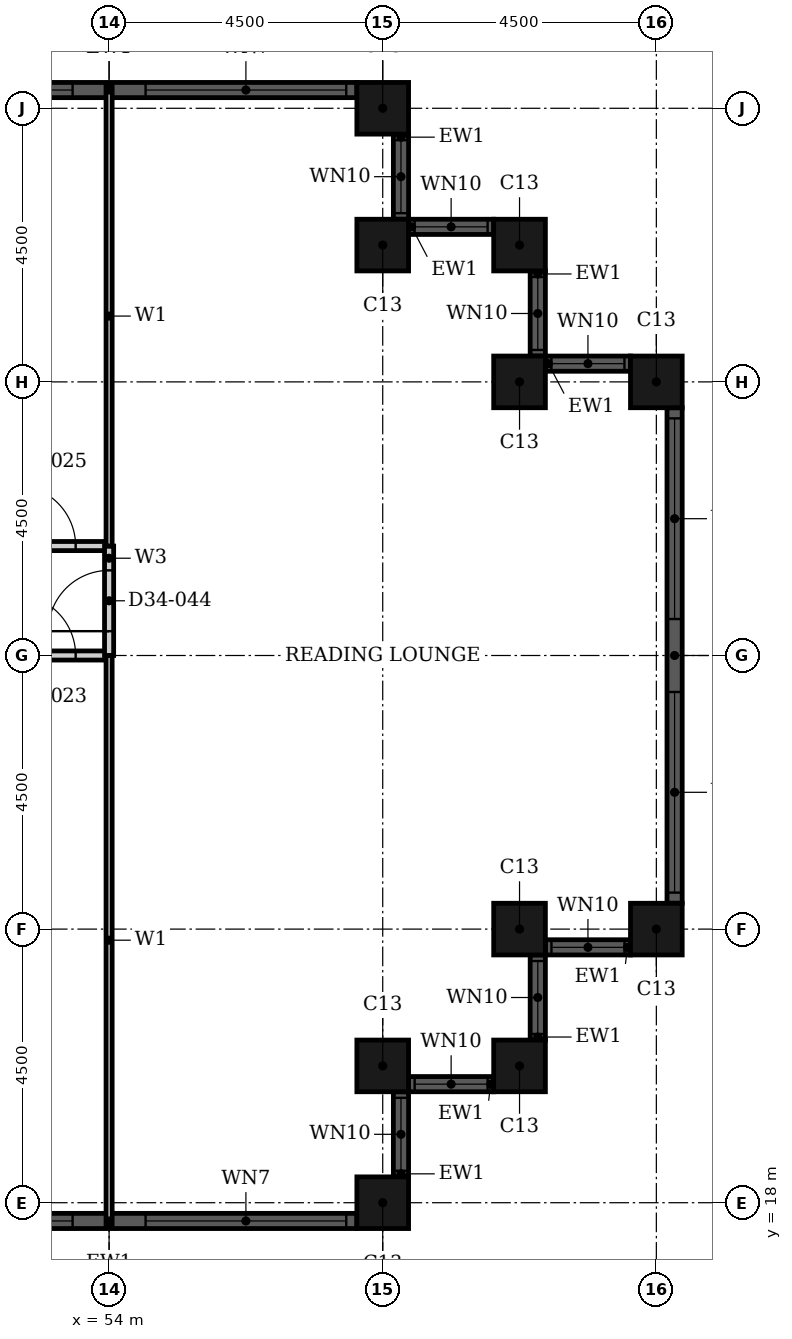
"""IFC4 building model, lengths in metres.
Left out: names, types, materials, properties, quantities, classifications, styles, units other than length and angle.
Written with IfcOpenShell. Run it as: python <this file> out.ifc"""

import sys

from ifc_helpers import new_model, si_unit, direction, frame, frame_2d, origin, origin_2d, place, context, subcontext, project, spatial, rectangle, hollow_rectangle, extrude, element, fill, save


model = new_model("IFC4")
c1 = context("Model", 3, precision=1e-05, world=origin(), true_north=direction((0.0, 1.0)))
c2 = subcontext(c1, "Body", "Model", "MODEL_VIEW")
j1 = project(units=[si_unit("LENGTHUNIT", "METRE"), si_unit("PLANEANGLEUNIT", "RADIAN")], contexts=[c1])
p1 = place(None, origin())
s1 = spatial("IfcSite", under=j1, at=p1, CompositionType="ELEMENT")
p2 = place(p1, origin())
s2 = spatial("IfcBuilding", under=s1, at=p2, CompositionType="ELEMENT")
p3 = place(p2, frame((0.0, 0.0, 136.8)))
s3 = spatial("IfcBuildingStorey", under=s2, at=p3, CompositionType="ELEMENT", Elevation=136.8)
for number, where, z_axis, x_axis in (
    (1, (58.5, 18.0, 0.0), (0.0, 0.0, 1.0), (1.0, 0.0, 0.0)),
    (2, (58.5, 20.25, 0.0), (0.0, 0.0, 1.0), (1.0, 0.0, 0.0)),
    (3, (60.75, 20.25, 0.0), (0.0, 0.0, 1.0), (1.0, 0.0, 0.0)),
    (4, (60.75, 22.5, 0.0), (0.0, 0.0, 1.0), (1.0, 0.0, 0.0)),
    (5, (63.0, 22.5, 0.0), (0.0, 0.0, 1.0), (1.0, 0.0, 0.0)),
    (6, (63.0, 31.5, 0.0), (0.0, 0.0, 1.0), (1.0, 0.0, 0.0)),
    (7, (60.75, 31.5, 0.0), (0.0, 0.0, 1.0), (1.0, 0.0, 0.0)),
    (8, (60.75, 33.75, 0.0), (0.0, 0.0, 1.0), (1.0, 0.0, 0.0)),
    (9, (58.5, 33.75, 0.0), (0.0, 0.0, 1.0), (1.0, 0.0, 0.0)),
    (10, (58.5, 36.0, 0.0), (0.0, 0.0, 1.0), (1.0, 0.0, 0.0)),
):
    element("IfcColumn", number, at=place(p3, frame(where, z_axis=z_axis, x_axis=x_axis)), inside=s3, PredefinedType="COLUMN", context=c2, shape_type="SweptSolid", body=[
        extrude(hollow_rectangle(XDim=0.85, YDim=0.85, WallThickness=0.026, at=origin_2d()), origin(), (0.0, 0.0, 1.0), 3.6),
    ])
p4 = place(p3, frame((49.925, 17.7, 0.0), z_axis=(0.0, 0.0, 1.0), x_axis=(1.0, 0.0, 0.0)))
e11 = element("IfcWall", 11, at=p4, inside=s3, PredefinedType="SOLIDWALL", context=c2, shape_type="SweptSolid", body=[
    extrude(rectangle(XDim=8.15, YDim=0.25, at=frame_2d((4.075, 0.0))), origin(), (0.0, 0.0, 1.0), 3.6),
])
p5 = place(p4, frame((0.175, 0.0, 0.9)))
e12 = element("IfcOpeningElement", 12, at=p5, cuts=e11, PredefinedType="OPENING", context=c2, shape_type="SweptSolid", body=[
    extrude(rectangle(XDim=3.3, YDim=1.85, at=frame_2d((1.65, 0.925))), frame((0.0, 0.135, 0.0), z_axis=(0.0, -1.0, 0.0), x_axis=(1.0, 0.0, 0.0)), (0.0, 0.0, 1.0), 0.27),
])
p6 = place(p4, frame((4.675, 0.0, 0.9)))
e13 = element("IfcOpeningElement", 13, at=p6, cuts=e11, PredefinedType="OPENING", context=c2, shape_type="SweptSolid", body=[
    extrude(rectangle(XDim=3.3, YDim=1.85, at=frame_2d((1.65, 0.925))), frame((0.0, 0.135, 0.0), z_axis=(0.0, -1.0, 0.0), x_axis=(1.0, 0.0, 0.0)), (0.0, 0.0, 1.0), 0.27),
])
p7 = place(p3, frame((58.8, 18.425, 0.0), z_axis=(0.0, 0.0, 1.0), x_axis=(0.0, 1.0, 0.0)))
e14 = element("IfcWall", 14, at=p7, inside=s3, PredefinedType="SOLIDWALL", context=c2, shape_type="SweptSolid", body=[
    extrude(rectangle(XDim=1.4, YDim=0.25, at=frame_2d((0.7, 0.0))), origin(), (0.0, 0.0, 1.0), 3.6),
])
p8 = place(p7, frame((0.1, 0.0, 0.9)))
e15 = element("IfcOpeningElement", 15, at=p8, cuts=e14, PredefinedType="OPENING", context=c2, shape_type="SweptSolid", body=[
    extrude(rectangle(XDim=1.2, YDim=1.85, at=frame_2d((0.6, 0.925))), frame((0.0, 0.135, 0.0), z_axis=(0.0, -1.0, 0.0), x_axis=(1.0, 0.0, 0.0)), (0.0, 0.0, 1.0), 0.27),
])
p9 = place(p3, frame((58.925, 19.95, 0.0), z_axis=(0.0, 0.0, 1.0), x_axis=(1.0, 0.0, 0.0)))
e16 = element("IfcWall", 16, at=p9, inside=s3, PredefinedType="SOLIDWALL", context=c2, shape_type="SweptSolid", body=[
    extrude(rectangle(XDim=1.4, YDim=0.25, at=frame_2d((0.7, 0.0))), origin(), (0.0, 0.0, 1.0), 3.6),
])
p10 = place(p9, frame((0.1, 0.0, 0.9)))
e17 = element("IfcOpeningElement", 17, at=p10, cuts=e16, PredefinedType="OPENING", context=c2, shape_type="SweptSolid", body=[
    extrude(rectangle(XDim=1.2, YDim=1.85, at=frame_2d((0.6, 0.925))), frame((0.0, 0.135, 0.0), z_axis=(0.0, -1.0, 0.0), x_axis=(1.0, 0.0, 0.0)), (0.0, 0.0, 1.0), 0.27),
])
p11 = place(p3, frame((61.05, 20.675, 0.0), z_axis=(0.0, 0.0, 1.0), x_axis=(0.0, 1.0, 0.0)))
e18 = element("IfcWall", 18, at=p11, inside=s3, PredefinedType="SOLIDWALL", context=c2, shape_type="SweptSolid", body=[
    extrude(rectangle(XDim=1.4, YDim=0.25, at=frame_2d((0.7, 0.0))), origin(), (0.0, 0.0, 1.0), 3.6),
])
p12 = place(p11, frame((0.1, 0.0, 0.9)))
e19 = element("IfcOpeningElement", 19, at=p12, cuts=e18, PredefinedType="OPENING", context=c2, shape_type="SweptSolid", body=[
    extrude(rectangle(XDim=1.2, YDim=1.85, at=frame_2d((0.6, 0.925))), frame((0.0, 0.135, 0.0), z_axis=(0.0, -1.0, 0.0), x_axis=(1.0, 0.0, 0.0)), (0.0, 0.0, 1.0), 0.27),
])
p13 = place(p3, frame((61.175, 22.2, 0.0), z_axis=(0.0, 0.0, 1.0), x_axis=(1.0, 0.0, 0.0)))
e20 = element("IfcWall", 20, at=p13, inside=s3, PredefinedType="SOLIDWALL", context=c2, shape_type="SweptSolid", body=[
    extrude(rectangle(XDim=1.4, YDim=0.25, at=frame_2d((0.7, 0.0))), origin(), (0.0, 0.0, 1.0), 3.6),
])
p14 = place(p13, frame((0.1, 0.0, 0.9)))
e21 = element("IfcOpeningElement", 21, at=p14, cuts=e20, PredefinedType="OPENING", context=c2, shape_type="SweptSolid", body=[
    extrude(rectangle(XDim=1.2, YDim=1.85, at=frame_2d((0.6, 0.925))), frame((0.0, 0.135, 0.0), z_axis=(0.0, -1.0, 0.0), x_axis=(1.0, 0.0, 0.0)), (0.0, 0.0, 1.0), 0.27),
])
p15 = place(p3, frame((63.3, 22.925, 0.0), z_axis=(0.0, 0.0, 1.0), x_axis=(0.0, 1.0, 0.0)))
e22 = element("IfcWall", 22, at=p15, inside=s3, PredefinedType="SOLIDWALL", context=c2, shape_type="SweptSolid", body=[
    extrude(rectangle(XDim=8.15, YDim=0.25, at=frame_2d((4.075, 0.0))), origin(), (0.0, 0.0, 1.0), 3.6),
])
p16 = place(p15, frame((0.175, 0.0, 0.9)))
e23 = element("IfcOpeningElement", 23, at=p16, cuts=e22, PredefinedType="OPENING", context=c2, shape_type="SweptSolid", body=[
    extrude(rectangle(XDim=3.3, YDim=1.85, at=frame_2d((1.65, 0.925))), frame((0.0, 0.135, 0.0), z_axis=(0.0, -1.0, 0.0), x_axis=(1.0, 0.0, 0.0)), (0.0, 0.0, 1.0), 0.27),
])
p17 = place(p15, frame((4.675, 0.0, 0.9)))
e24 = element("IfcOpeningElement", 24, at=p17, cuts=e22, PredefinedType="OPENING", context=c2, shape_type="SweptSolid", body=[
    extrude(rectangle(XDim=3.3, YDim=1.85, at=frame_2d((1.65, 0.925))), frame((0.0, 0.135, 0.0), z_axis=(0.0, -1.0, 0.0), x_axis=(1.0, 0.0, 0.0)), (0.0, 0.0, 1.0), 0.27),
])
p18 = place(p3, frame((62.575, 31.8, 0.0), z_axis=(0.0, 0.0, 1.0), x_axis=(-1.0, 0.0, 0.0)))
e25 = element("IfcWall", 25, at=p18, inside=s3, PredefinedType="SOLIDWALL", context=c2, shape_type="SweptSolid", body=[
    extrude(rectangle(XDim=1.4, YDim=0.25, at=frame_2d((0.7, 0.0))), origin(), (0.0, 0.0, 1.0), 3.6),
])
p19 = place(p18, frame((0.1, 0.0, 0.9)))
e26 = element("IfcOpeningElement", 26, at=p19, cuts=e25, PredefinedType="OPENING", context=c2, shape_type="SweptSolid", body=[
    extrude(rectangle(XDim=1.2, YDim=1.85, at=frame_2d((0.6, 0.925))), frame((0.0, 0.135, 0.0), z_axis=(0.0, -1.0, 0.0), x_axis=(1.0, 0.0, 0.0)), (0.0, 0.0, 1.0), 0.27),
])
p20 = place(p3, frame((61.05, 31.925, 0.0), z_axis=(0.0, 0.0, 1.0), x_axis=(0.0, 1.0, 0.0)))
e27 = element("IfcWall", 27, at=p20, inside=s3, PredefinedType="SOLIDWALL", context=c2, shape_type="SweptSolid", body=[
    extrude(rectangle(XDim=1.4, YDim=0.25, at=frame_2d((0.7, 0.0))), origin(), (0.0, 0.0, 1.0), 3.6),
])
p21 = place(p20, frame((0.1, 0.0, 0.9)))
e28 = element("IfcOpeningElement", 28, at=p21, cuts=e27, PredefinedType="OPENING", context=c2, shape_type="SweptSolid", body=[
    extrude(rectangle(XDim=1.2, YDim=1.85, at=frame_2d((0.6, 0.925))), frame((0.0, 0.135, 0.0), z_axis=(0.0, -1.0, 0.0), x_axis=(1.0, 0.0, 0.0)), (0.0, 0.0, 1.0), 0.27),
])
p22 = place(p3, frame((60.325, 34.05, 0.0), z_axis=(0.0, 0.0, 1.0), x_axis=(-1.0, 0.0, 0.0)))
e29 = element("IfcWall", 29, at=p22, inside=s3, PredefinedType="SOLIDWALL", context=c2, shape_type="SweptSolid", body=[
    extrude(rectangle(XDim=1.4, YDim=0.25, at=frame_2d((0.7, 0.0))), origin(), (0.0, 0.0, 1.0), 3.6),
])
p23 = place(p22, frame((0.1, 0.0, 0.9)))
e30 = element("IfcOpeningElement", 30, at=p23, cuts=e29, PredefinedType="OPENING", context=c2, shape_type="SweptSolid", body=[
    extrude(rectangle(XDim=1.2, YDim=1.85, at=frame_2d((0.6, 0.925))), frame((0.0, 0.135, 0.0), z_axis=(0.0, -1.0, 0.0), x_axis=(1.0, 0.0, 0.0)), (0.0, 0.0, 1.0), 0.27),
])
p24 = place(p3, frame((58.8, 34.175, 0.0), z_axis=(0.0, 0.0, 1.0), x_axis=(0.0, 1.0, 0.0)))
e31 = element("IfcWall", 31, at=p24, inside=s3, PredefinedType="SOLIDWALL", context=c2, shape_type="SweptSolid", body=[
    extrude(rectangle(XDim=1.4, YDim=0.25, at=frame_2d((0.7, 0.0))), origin(), (0.0, 0.0, 1.0), 3.6),
])
p25 = place(p24, frame((0.1, 0.0, 0.9)))
e32 = element("IfcOpeningElement", 32, at=p25, cuts=e31, PredefinedType="OPENING", context=c2, shape_type="SweptSolid", body=[
    extrude(rectangle(XDim=1.2, YDim=1.85, at=frame_2d((0.6, 0.925))), frame((0.0, 0.135, 0.0), z_axis=(0.0, -1.0, 0.0), x_axis=(1.0, 0.0, 0.0)), (0.0, 0.0, 1.0), 0.27),
])
p26 = place(p3, frame((58.075, 36.3, 0.0), z_axis=(0.0, 0.0, 1.0), x_axis=(-1.0, 0.0, 0.0)))
e33 = element("IfcWall", 33, at=p26, inside=s3, PredefinedType="SOLIDWALL", context=c2, shape_type="SweptSolid", body=[
    extrude(rectangle(XDim=8.15, YDim=0.25, at=frame_2d((4.075, 0.0))), origin(), (0.0, 0.0, 1.0), 3.6),
])
p27 = place(p26, frame((0.175, 0.0, 0.9)))
e34 = element("IfcOpeningElement", 34, at=p27, cuts=e33, PredefinedType="OPENING", context=c2, shape_type="SweptSolid", body=[
    extrude(rectangle(XDim=3.3, YDim=1.85, at=frame_2d((1.65, 0.925))), frame((0.0, 0.135, 0.0), z_axis=(0.0, -1.0, 0.0), x_axis=(1.0, 0.0, 0.0)), (0.0, 0.0, 1.0), 0.27),
])
p28 = place(p26, frame((4.675, 0.0, 0.9)))
e35 = element("IfcOpeningElement", 35, at=p28, cuts=e33, PredefinedType="OPENING", context=c2, shape_type="SweptSolid", body=[
    extrude(rectangle(XDim=3.3, YDim=1.85, at=frame_2d((1.65, 0.925))), frame((0.0, 0.135, 0.0), z_axis=(0.0, -1.0, 0.0), x_axis=(1.0, 0.0, 0.0)), (0.0, 0.0, 1.0), 0.27),
])
p29 = place(p3, frame((46.8, 27.0, 0.0), z_axis=(0.0, 0.0, 1.0), x_axis=(1.0, 0.0, 0.0)))
e36 = element("IfcWall", 36, at=p29, inside=s3, PredefinedType="PARTITIONING", context=c2, shape_type="SweptSolid", body=[
    extrude(rectangle(XDim=7.2, YDim=0.15, at=frame_2d((3.6, 0.0))), origin(), (0.0, 0.0, 1.0), 2.48),
])
p30 = place(p29, frame((5.65, 0.0, 0.0)))
e37 = element("IfcOpeningElement", 37, at=p30, cuts=e36, PredefinedType="OPENING", context=c2, shape_type="SweptSolid", body=[
    extrude(rectangle(XDim=1.0, YDim=2.1, at=frame_2d((0.5, 1.05))), frame((0.0, 0.085, 0.0), z_axis=(0.0, -1.0, 0.0), x_axis=(1.0, 0.0, 0.0)), (0.0, 0.0, 1.0), 0.17),
])
p31 = place(p3, frame((46.8, 28.8, 0.0), z_axis=(0.0, 0.0, 1.0), x_axis=(1.0, 0.0, 0.0)))
e38 = element("IfcWall", 38, at=p31, inside=s3, PredefinedType="PARTITIONING", context=c2, shape_type="SweptSolid", body=[
    extrude(rectangle(XDim=7.2, YDim=0.15, at=frame_2d((3.6, 0.0))), origin(), (0.0, 0.0, 1.0), 3.2),
])
p32 = place(p31, frame((5.65, 0.0, 0.0)))
e39 = element("IfcOpeningElement", 39, at=p32, cuts=e38, PredefinedType="OPENING", context=c2, shape_type="SweptSolid", body=[
    extrude(rectangle(XDim=1.0, YDim=2.1, at=frame_2d((0.5, 1.05))), frame((0.0, 0.085, 0.0), z_axis=(0.0, -1.0, 0.0), x_axis=(1.0, 0.0, 0.0)), (0.0, 0.0, 1.0), 0.17),
])
p33 = place(p3, frame((54.0, 27.0, 0.0), z_axis=(0.0, 0.0, 1.0), x_axis=(0.0, 1.0, 0.0)))
e40 = element("IfcWall", 40, at=p33, inside=s3, PredefinedType="PARTITIONING", context=c2, shape_type="SweptSolid", body=[
    extrude(rectangle(XDim=1.8, YDim=0.15, at=frame_2d((0.9, 0.0))), origin(), (0.0, 0.0, 1.0), 3.2),
])
p34 = place(p33, frame((0.4, 0.0, 0.0)))
e41 = element("IfcOpeningElement", 41, at=p34, cuts=e40, PredefinedType="OPENING", context=c2, shape_type="SweptSolid", body=[
    extrude(rectangle(XDim=1.0, YDim=2.1, at=frame_2d((0.5, 1.05))), frame((0.0, 0.085, 0.0), z_axis=(0.0, -1.0, 0.0), x_axis=(1.0, 0.0, 0.0)), (0.0, 0.0, 1.0), 0.17),
])
p35 = place(p3, frame((54.0, 28.8, 0.0), z_axis=(0.0, 0.0, 1.0), x_axis=(0.0, 1.0, 0.0)))
e42 = element("IfcWall", 42, at=p35, inside=s3, PredefinedType="PARTITIONING", context=c2, shape_type="SweptSolid", body=[
    extrude(rectangle(XDim=7.565, YDim=0.1, at=frame_2d((3.782, 0.0))), origin(), (0.0, 0.0, 1.0), 3.2),
])
p36 = place(p3, frame((54.0, 17.635, 0.0), z_axis=(0.0, 0.0, 1.0), x_axis=(0.0, 1.0, 0.0)))
e43 = element("IfcWall", 43, at=p36, inside=s3, PredefinedType="PARTITIONING", context=c2, shape_type="SweptSolid", body=[
    extrude(rectangle(XDim=9.365, YDim=0.1, at=frame_2d((4.683, 0.0))), origin(), (0.0, 0.0, 1.0), 3.2),
])
p37 = place(p5, origin())
e44 = element("IfcWindow", 44, at=p37, inside=s3, PartitioningType="SINGLE_PANEL", PredefinedType="WINDOW", context=c2, shape_type="SweptSolid", body=[
    extrude(rectangle(XDim=3.3, YDim=1.85, at=frame_2d((1.65, 0.925))), frame((0.0, 0.03, 0.0), z_axis=(0.0, -1.0, 0.0), x_axis=(1.0, 0.0, 0.0)), (0.0, 0.0, 1.0), 0.06),
])
fill(e12, e44)
p38 = place(p6, origin())
e45 = element("IfcWindow", 45, at=p38, inside=s3, PartitioningType="SINGLE_PANEL", PredefinedType="WINDOW", context=c2, shape_type="SweptSolid", body=[
    extrude(rectangle(XDim=3.3, YDim=1.85, at=frame_2d((1.65, 0.925))), frame((0.0, 0.03, 0.0), z_axis=(0.0, -1.0, 0.0), x_axis=(1.0, 0.0, 0.0)), (0.0, 0.0, 1.0), 0.06),
])
fill(e13, e45)
p39 = place(p8, origin())
e46 = element("IfcWindow", 46, at=p39, inside=s3, PartitioningType="SINGLE_PANEL", PredefinedType="WINDOW", context=c2, shape_type="SweptSolid", body=[
    extrude(rectangle(XDim=1.2, YDim=1.85, at=frame_2d((0.6, 0.925))), frame((0.0, 0.03, 0.0), z_axis=(0.0, -1.0, 0.0), x_axis=(1.0, 0.0, 0.0)), (0.0, 0.0, 1.0), 0.06),
])
fill(e15, e46)
p40 = place(p10, origin())
e47 = element("IfcWindow", 47, at=p40, inside=s3, PartitioningType="SINGLE_PANEL", PredefinedType="WINDOW", context=c2, shape_type="SweptSolid", body=[
    extrude(rectangle(XDim=1.2, YDim=1.85, at=frame_2d((0.6, 0.925))), frame((0.0, 0.03, 0.0), z_axis=(0.0, -1.0, 0.0), x_axis=(1.0, 0.0, 0.0)), (0.0, 0.0, 1.0), 0.06),
])
fill(e17, e47)
p41 = place(p12, origin())
e48 = element("IfcWindow", 48, at=p41, inside=s3, PartitioningType="SINGLE_PANEL", PredefinedType="WINDOW", context=c2, shape_type="SweptSolid", body=[
    extrude(rectangle(XDim=1.2, YDim=1.85, at=frame_2d((0.6, 0.925))), frame((0.0, 0.03, 0.0), z_axis=(0.0, -1.0, 0.0), x_axis=(1.0, 0.0, 0.0)), (0.0, 0.0, 1.0), 0.06),
])
fill(e19, e48)
p42 = place(p14, origin())
e49 = element("IfcWindow", 49, at=p42, inside=s3, PartitioningType="SINGLE_PANEL", PredefinedType="WINDOW", context=c2, shape_type="SweptSolid", body=[
    extrude(rectangle(XDim=1.2, YDim=1.85, at=frame_2d((0.6, 0.925))), frame((0.0, 0.03, 0.0), z_axis=(0.0, -1.0, 0.0), x_axis=(1.0, 0.0, 0.0)), (0.0, 0.0, 1.0), 0.06),
])
fill(e21, e49)
p43 = place(p16, origin())
e50 = element("IfcWindow", 50, at=p43, inside=s3, PartitioningType="SINGLE_PANEL", PredefinedType="WINDOW", context=c2, shape_type="SweptSolid", body=[
    extrude(rectangle(XDim=3.3, YDim=1.85, at=frame_2d((1.65, 0.925))), frame((0.0, 0.03, 0.0), z_axis=(0.0, -1.0, 0.0), x_axis=(1.0, 0.0, 0.0)), (0.0, 0.0, 1.0), 0.06),
])
fill(e23, e50)
p44 = place(p17, origin())
e51 = element("IfcWindow", 51, at=p44, inside=s3, PartitioningType="SINGLE_PANEL", PredefinedType="WINDOW", context=c2, shape_type="SweptSolid", body=[
    extrude(rectangle(XDim=3.3, YDim=1.85, at=frame_2d((1.65, 0.925))), frame((0.0, 0.03, 0.0), z_axis=(0.0, -1.0, 0.0), x_axis=(1.0, 0.0, 0.0)), (0.0, 0.0, 1.0), 0.06),
])
fill(e24, e51)
p45 = place(p19, origin())
e52 = element("IfcWindow", 52, at=p45, inside=s3, PartitioningType="SINGLE_PANEL", PredefinedType="WINDOW", context=c2, shape_type="SweptSolid", body=[
    extrude(rectangle(XDim=1.2, YDim=1.85, at=frame_2d((0.6, 0.925))), frame((0.0, 0.03, 0.0), z_axis=(0.0, -1.0, 0.0), x_axis=(1.0, 0.0, 0.0)), (0.0, 0.0, 1.0), 0.06),
])
fill(e26, e52)
p46 = place(p21, origin())
e53 = element("IfcWindow", 53, at=p46, inside=s3, PartitioningType="SINGLE_PANEL", PredefinedType="WINDOW", context=c2, shape_type="SweptSolid", body=[
    extrude(rectangle(XDim=1.2, YDim=1.85, at=frame_2d((0.6, 0.925))), frame((0.0, 0.03, 0.0), z_axis=(0.0, -1.0, 0.0), x_axis=(1.0, 0.0, 0.0)), (0.0, 0.0, 1.0), 0.06),
])
fill(e28, e53)
p47 = place(p23, origin())
e54 = element("IfcWindow", 54, at=p47, inside=s3, PartitioningType="SINGLE_PANEL", PredefinedType="WINDOW", context=c2, shape_type="SweptSolid", body=[
    extrude(rectangle(XDim=1.2, YDim=1.85, at=frame_2d((0.6, 0.925))), frame((0.0, 0.03, 0.0), z_axis=(0.0, -1.0, 0.0), x_axis=(1.0, 0.0, 0.0)), (0.0, 0.0, 1.0), 0.06),
])
fill(e30, e54)
p48 = place(p25, origin())
e55 = element("IfcWindow", 55, at=p48, inside=s3, PartitioningType="SINGLE_PANEL", PredefinedType="WINDOW", context=c2, shape_type="SweptSolid", body=[
    extrude(rectangle(XDim=1.2, YDim=1.85, at=frame_2d((0.6, 0.925))), frame((0.0, 0.03, 0.0), z_axis=(0.0, -1.0, 0.0), x_axis=(1.0, 0.0, 0.0)), (0.0, 0.0, 1.0), 0.06),
])
fill(e32, e55)
p49 = place(p27, origin())
e56 = element("IfcWindow", 56, at=p49, inside=s3, PartitioningType="SINGLE_PANEL", PredefinedType="WINDOW", context=c2, shape_type="SweptSolid", body=[
    extrude(rectangle(XDim=3.3, YDim=1.85, at=frame_2d((1.65, 0.925))), frame((0.0, 0.03, 0.0), z_axis=(0.0, -1.0, 0.0), x_axis=(1.0, 0.0, 0.0)), (0.0, 0.0, 1.0), 0.06),
])
fill(e34, e56)
p50 = place(p28, origin())
e57 = element("IfcWindow", 57, at=p50, inside=s3, PartitioningType="SINGLE_PANEL", PredefinedType="WINDOW", context=c2, shape_type="SweptSolid", body=[
    extrude(rectangle(XDim=3.3, YDim=1.85, at=frame_2d((1.65, 0.925))), frame((0.0, 0.03, 0.0), z_axis=(0.0, -1.0, 0.0), x_axis=(1.0, 0.0, 0.0)), (0.0, 0.0, 1.0), 0.06),
])
fill(e35, e57)
p51 = place(p30, origin())
e58 = element("IfcDoor", 58, at=p51, inside=s3, OperationType="SINGLE_SWING_RIGHT", PredefinedType="DOOR", context=c2, shape_type="SweptSolid", body=[
    extrude(rectangle(XDim=1.0, YDim=2.1, at=frame_2d((0.5, 1.05))), frame((0.0, 0.025, 0.0), z_axis=(0.0, -1.0, 0.0), x_axis=(1.0, 0.0, 0.0)), (0.0, 0.0, 1.0), 0.05),
])
fill(e37, e58)
p52 = place(p32, origin())
e59 = element("IfcDoor", 59, at=p52, inside=s3, OperationType="SINGLE_SWING_RIGHT", PredefinedType="DOOR", context=c2, shape_type="SweptSolid", body=[
    extrude(rectangle(XDim=1.0, YDim=2.1, at=frame_2d((0.5, 1.05))), frame((0.0, 0.025, 0.0), z_axis=(0.0, -1.0, 0.0), x_axis=(1.0, 0.0, 0.0)), (0.0, 0.0, 1.0), 0.05),
])
fill(e39, e59)
p53 = place(p34, origin())
e60 = element("IfcDoor", 60, at=p53, inside=s3, OperationType="SINGLE_SWING_LEFT", PredefinedType="DOOR", context=c2, shape_type="SweptSolid", body=[
    extrude(rectangle(XDim=1.0, YDim=2.1, at=frame_2d((0.5, 1.05))), frame((0.0, 0.025, 0.0), z_axis=(0.0, -1.0, 0.0), x_axis=(1.0, 0.0, 0.0)), (0.0, 0.0, 1.0), 0.05),
])
fill(e41, e60)
save(model, sys.argv[1])
